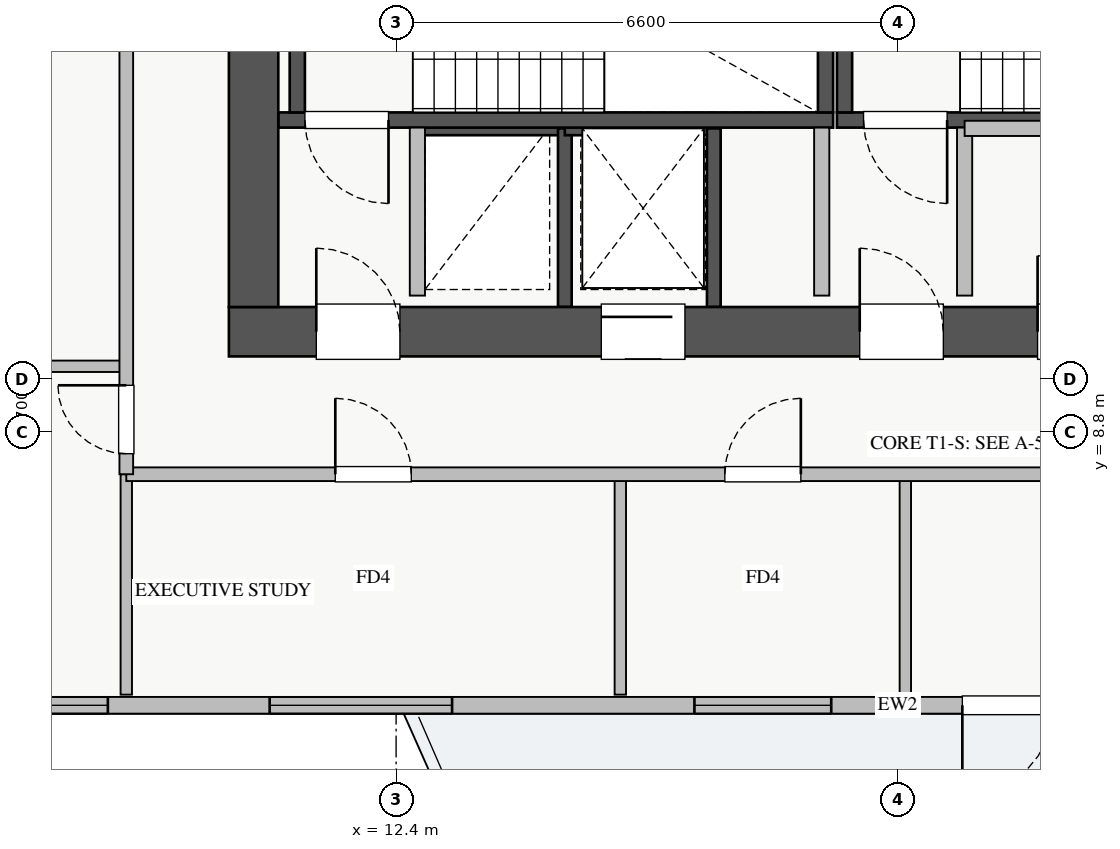
"""IFC4 building model, lengths in metres.
Left out: names, types, materials, properties, quantities, classifications, styles, units other than length and angle.
Written with IfcOpenShell. Run it as: python <this file> out.ifc"""

import sys

from ifc_helpers import new_model, si_unit, direction, frame, frame_2d, origin, place, context, subcontext, project, spatial, rectangle, extrude, source, transform, mapped, element, fill, save


model = new_model("IFC4")
c1 = context("Model", 3, precision=1e-05, world=origin(), true_north=direction((0.0, 1.0)))
c2 = subcontext(c1, "Body", "Model", "MODEL_VIEW")
j1 = project(units=[si_unit("LENGTHUNIT", "METRE"), si_unit("PLANEANGLEUNIT", "RADIAN")], contexts=[c1])
p1 = place(None, origin())
s1 = spatial("IfcSite", under=j1, at=p1, CompositionType="ELEMENT")
p2 = place(p1, origin())
s2 = spatial("IfcBuilding", under=s1, at=p2, CompositionType="ELEMENT")
p3 = place(p2, frame((0.0, 0.0, 119.75)))
s3 = spatial("IfcBuildingStorey", under=s2, at=p3, CompositionType="ELEMENT", Elevation=119.75)
p4 = place(p3, frame((12.68, 12.8, 0.0), z_axis=(0.0, 0.0, 1.0), x_axis=(1.0, 0.0, 0.0)))
e1 = element("IfcWall", 1, at=p4, inside=s3, PredefinedType="SHEAR", context=c2, shape_type="SweptSolid", body=[
    extrude(rectangle(XDim=1.94, YDim=0.18, at=frame_2d((0.97, 0.0))), origin(), (0.0, 0.0, 1.0), 3.07),
])
p5 = place(p3, frame((14.62, 10.45, 0.0), z_axis=(0.0, 0.0, 1.0), x_axis=(0.0, 1.0, 0.0)))
e2 = element("IfcWall", 2, at=p5, inside=s3, PredefinedType="SHEAR", context=c2, shape_type="SweptSolid", body=[
    extrude(rectangle(XDim=2.35, YDim=0.18, at=frame_2d((1.175, 0.0))), origin(), (0.0, 0.0, 1.0), 3.07),
])
p6 = place(p3, frame((14.62, 12.8, 0.0), z_axis=(0.0, 0.0, 1.0), x_axis=(1.0, 0.0, 0.0)))
e3 = element("IfcWall", 3, at=p6, inside=s3, PredefinedType="SHEAR", context=c2, shape_type="SweptSolid", body=[
    extrude(rectangle(XDim=1.96, YDim=0.18, at=frame_2d((0.98, 0.0))), origin(), (0.0, 0.0, 1.0), 3.07),
])
p7 = place(p3, frame((16.58, 10.45, 0.0), z_axis=(0.0, 0.0, 1.0), x_axis=(0.0, 1.0, 0.0)))
e4 = element("IfcWall", 4, at=p7, inside=s3, PredefinedType="SHEAR", context=c2, shape_type="SweptSolid", body=[
    extrude(rectangle(XDim=2.35, YDim=0.18, at=frame_2d((1.175, 0.0))), origin(), (0.0, 0.0, 1.0), 3.07),
])
p8 = place(p3, frame((10.85, 12.91, 0.0), z_axis=(0.0, 0.0, 1.0), x_axis=(1.0, 0.0, 0.0)))
e5 = element("IfcWall", 5, at=p8, inside=s3, PredefinedType="SHEAR", context=c2, shape_type="SweptSolid", body=[
    extrude(rectangle(XDim=7.3, YDim=0.2, at=frame_2d((3.65, 0.0))), origin(), (0.0, 0.0, 1.0), 3.25),
])
p9 = place(p8, frame((0.35, 0.0, 0.0)))
e6 = element("IfcOpeningElement", 6, at=p9, cuts=e5, PredefinedType="OPENING", context=c2, shape_type="SweptSolid", body=[
    extrude(rectangle(XDim=1.1, YDim=2.05, at=frame_2d((0.55, 1.025))), frame((0.0, 0.11, 0.0), z_axis=(0.0, -1.0, 0.0), x_axis=(1.0, 0.0, 0.0)), (0.0, 0.0, 1.0), 0.22),
])
for number, where, z_axis, x_axis in (
    (7, (11.1, 13.01, 0.0), (0.0, 0.0, 1.0), (0.0, 1.0, 0.0)),
    (8, (18.05, 13.01, 0.0), (0.0, 0.0, 1.0), (0.0, 1.0, 0.0)),
):
    element("IfcWall", number, at=place(p3, frame(where, z_axis=z_axis, x_axis=x_axis)), inside=s3, PredefinedType="SHEAR", context=c2, shape_type="SweptSolid", body=[
        extrude(rectangle(XDim=2.94, YDim=0.2, at=frame_2d((1.47, 0.0))), origin(), (0.0, 0.0, 1.0), 3.25),
    ])
p10 = place(p3, frame((18.2, 12.91, 0.0), z_axis=(0.0, 0.0, 1.0), x_axis=(1.0, 0.0, 0.0)))
e9 = element("IfcWall", 9, at=p10, inside=s3, PredefinedType="SHEAR", context=c2, shape_type="SweptSolid", body=[
    extrude(rectangle(XDim=7.15, YDim=0.2, at=frame_2d((3.575, 0.0))), origin(), (0.0, 0.0, 1.0), 3.25),
])
p11 = place(p10, frame((0.35, 0.0, 0.0)))
e10 = element("IfcOpeningElement", 10, at=p11, cuts=e9, PredefinedType="OPENING", context=c2, shape_type="SweptSolid", body=[
    extrude(rectangle(XDim=1.1, YDim=2.05, at=frame_2d((0.55, 1.025))), frame((0.0, 0.11, 0.0), z_axis=(0.0, -1.0, 0.0), x_axis=(1.0, 0.0, 0.0)), (0.0, 0.0, 1.0), 0.22),
])
p12 = place(p3, frame((18.3, 13.01, 0.0), z_axis=(0.0, 0.0, 1.0), x_axis=(0.0, 1.0, 0.0)))
e11 = element("IfcWall", 11, at=p12, inside=s3, PredefinedType="SHEAR", context=c2, shape_type="SweptSolid", body=[
    extrude(rectangle(XDim=2.94, YDim=0.2, at=frame_2d((1.47, 0.0))), origin(), (0.0, 0.0, 1.0), 3.25),
])
p13 = place(p3, frame((10.2, 10.125, 0.0), z_axis=(0.0, 0.0, 1.0), x_axis=(1.0, 0.0, 0.0)))
e12 = element("IfcWall", 12, at=p13, inside=s3, PredefinedType="SHEAR", context=c2, shape_type="SweptSolid", body=[
    extrude(rectangle(XDim=17.6, YDim=0.65, at=frame_2d((8.8, 0.0))), origin(), (0.0, 0.0, 1.0), 3.25),
])
p14 = place(p13, frame((1.15, 0.0, 0.0)))
e13 = element("IfcOpeningElement", 13, at=p14, cuts=e12, PredefinedType="OPENING", context=c2, shape_type="SweptSolid", body=[
    extrude(rectangle(XDim=1.1, YDim=2.05, at=frame_2d((0.55, 1.025))), frame((0.0, 0.335, 0.0), z_axis=(0.0, -1.0, 0.0), x_axis=(1.0, 0.0, 0.0)), (0.0, 0.0, 1.0), 0.67),
])
p15 = place(p13, frame((8.3, 0.0, 0.0)))
e14 = element("IfcOpeningElement", 14, at=p15, cuts=e12, PredefinedType="OPENING", context=c2, shape_type="SweptSolid", body=[
    extrude(rectangle(XDim=1.1, YDim=2.05, at=frame_2d((0.55, 1.025))), frame((0.0, 0.335, 0.0), z_axis=(0.0, -1.0, 0.0), x_axis=(1.0, 0.0, 0.0)), (0.0, 0.0, 1.0), 0.67),
])
p16 = place(p13, frame((4.9, 0.0, 0.0)))
e15 = element("IfcOpeningElement", 15, at=p16, cuts=e12, PredefinedType="OPENING", context=c2, shape_type="SweptSolid", body=[
    extrude(rectangle(XDim=1.1, YDim=2.05, at=frame_2d((0.55, 1.025))), frame((0.0, 0.335, 0.0), z_axis=(0.0, -1.0, 0.0), x_axis=(1.0, 0.0, 0.0)), (0.0, 0.0, 1.0), 0.67),
])
p17 = place(p13, frame((14.74, 0.0, 0.0)))
e16 = element("IfcOpeningElement", 16, at=p17, cuts=e12, PredefinedType="OPENING", context=c2, shape_type="SweptSolid", body=[
    extrude(rectangle(XDim=1.0, YDim=2.05, at=frame_2d((0.5, 1.025))), frame((0.0, 0.335, 0.0), z_axis=(0.0, -1.0, 0.0), x_axis=(1.0, 0.0, 0.0)), (0.0, 0.0, 1.0), 0.67),
])
p18 = place(p13, frame((10.64, 0.0, 0.0)))
e17 = element("IfcOpeningElement", 17, at=p18, cuts=e12, PredefinedType="OPENING", context=c2, shape_type="SweptSolid", body=[
    extrude(rectangle(XDim=1.0, YDim=2.05, at=frame_2d((0.5, 1.025))), frame((0.0, 0.335, 0.0), z_axis=(0.0, -1.0, 0.0), x_axis=(1.0, 0.0, 0.0)), (0.0, 0.0, 1.0), 0.67),
])
p19 = place(p13, frame((13.09, 0.0, 0.0)))
e18 = element("IfcOpeningElement", 18, at=p19, cuts=e12, PredefinedType="OPENING", context=c2, shape_type="SweptSolid", body=[
    extrude(rectangle(XDim=1.0, YDim=2.05, at=frame_2d((0.5, 1.025))), frame((0.0, 0.335, 0.0), z_axis=(0.0, -1.0, 0.0), x_axis=(1.0, 0.0, 0.0)), (0.0, 0.0, 1.0), 0.67),
])
p20 = place(p3, frame((10.525, 10.45, 0.0), z_axis=(0.0, 0.0, 1.0), x_axis=(0.0, 1.0, 0.0)))
e19 = element("IfcWall", 19, at=p20, inside=s3, PredefinedType="SHEAR", context=c2, shape_type="SweptSolid", body=[
    extrude(rectangle(XDim=5.9, YDim=0.65, at=frame_2d((2.95, 0.0))), origin(), (0.0, 0.0, 1.0), 3.25),
])
p21 = place(p3, frame((6.55, 5.21, 0.0), z_axis=(0.0, 0.0, 1.0), x_axis=(1.0, 0.0, 0.0)))
e20 = element("IfcWall", 20, at=p21, inside=s3, PredefinedType="STANDARD", context=c2, shape_type="SweptSolid", body=[
    extrude(rectangle(XDim=24.9, YDim=0.22, at=frame_2d((12.45, 0.0))), origin(), (0.0, 0.0, 1.0), 2.61),
])
p22 = place(p21, frame((13.3, 0.0, 0.0)))
e21 = element("IfcOpeningElement", 21, at=p22, cuts=e20, PredefinedType="OPENING", context=c2, shape_type="SweptSolid", body=[
    extrude(rectangle(XDim=1.2, YDim=2.1, at=frame_2d((0.6, 1.05))), frame((0.0, 0.12, 0.0), z_axis=(0.0, -1.0, 0.0), x_axis=(1.0, 0.0, 0.0)), (0.0, 0.0, 1.0), 0.24),
])
p23 = place(p21, frame((0.258, 0.0, 0.9)))
e22 = element("IfcOpeningElement", 22, at=p23, cuts=e20, PredefinedType="OPENING", context=c2, shape_type="SweptSolid", body=[
    extrude(rectangle(XDim=1.8, YDim=1.5, at=frame_2d((0.9, 0.75))), frame((0.0, 0.12, 0.0), z_axis=(0.0, -1.0, 0.0), x_axis=(1.0, 0.0, 0.0)), (0.0, 0.0, 1.0), 0.24),
])
p24 = place(p21, frame((9.775, 0.0, 0.9)))
e23 = element("IfcOpeningElement", 23, at=p24, cuts=e20, PredefinedType="OPENING", context=c2, shape_type="SweptSolid", body=[
    extrude(rectangle(XDim=1.8, YDim=1.5, at=frame_2d((0.9, 0.75))), frame((0.0, 0.12, 0.0), z_axis=(0.0, -1.0, 0.0), x_axis=(1.0, 0.0, 0.0)), (0.0, 0.0, 1.0), 0.24),
])
p25 = place(p21, frame((14.813, 0.0, 0.9)))
e24 = element("IfcOpeningElement", 24, at=p25, cuts=e20, PredefinedType="OPENING", context=c2, shape_type="SweptSolid", body=[
    extrude(rectangle(XDim=1.5, YDim=1.45, at=frame_2d((0.75, 0.725))), frame((0.0, 0.12, 0.0), z_axis=(0.0, -1.0, 0.0), x_axis=(1.0, 0.0, 0.0)), (0.0, 0.0, 1.0), 0.24),
])
p26 = place(p21, frame((20.738, 0.0, 0.9)))
e25 = element("IfcOpeningElement", 25, at=p26, cuts=e20, PredefinedType="OPENING", context=c2, shape_type="SweptSolid", body=[
    extrude(rectangle(XDim=2.1, YDim=1.48, at=frame_2d((1.05, 0.74))), frame((0.0, 0.12, 0.0), z_axis=(0.0, -1.0, 0.0), x_axis=(1.0, 0.0, 0.0)), (0.0, 0.0, 1.0), 0.24),
])
p27 = place(p21, frame((4.187, 0.0, 0.9)))
e26 = element("IfcOpeningElement", 26, at=p27, cuts=e20, PredefinedType="OPENING", context=c2, shape_type="SweptSolid", body=[
    extrude(rectangle(XDim=2.4, YDim=1.5, at=frame_2d((1.2, 0.75))), frame((0.0, 0.12, 0.0), z_axis=(0.0, -1.0, 0.0), x_axis=(1.0, 0.0, 0.0)), (0.0, 0.0, 1.0), 0.24),
])
for number, where, z_axis, x_axis in (
    (27, (12.68, 10.6, 0.0), (0.0, 0.0, 1.0), (0.0, 1.0, 0.0)),
    (28, (18.0, 10.6, 0.0), (0.0, 0.0, 1.0), (0.0, 1.0, 0.0)),
    (29, (19.88, 10.6, 0.0), (0.0, 0.0, 1.0), (0.0, 1.0, 0.0)),
):
    element("IfcWall", number, at=place(p3, frame(where, z_axis=z_axis, x_axis=x_axis)), inside=s3, PredefinedType="PARTITIONING", context=c2, shape_type="SweptSolid", body=[
        extrude(rectangle(XDim=2.21, YDim=0.2, at=frame_2d((1.105, 0.0))), origin(), (0.0, 0.0, 1.0), 3.07),
    ])
p28 = place(p3, frame((19.88, 12.8, 0.0), z_axis=(0.0, 0.0, 1.0), x_axis=(1.0, 0.0, 0.0)))
e30 = element("IfcWall", 30, at=p28, inside=s3, PredefinedType="PARTITIONING", context=c2, shape_type="SweptSolid", body=[
    extrude(rectangle(XDim=1.87, YDim=0.2, at=frame_2d((0.935, 0.0))), origin(), (0.0, 0.0, 1.0), 3.07),
])
p29 = place(p3, frame((15.35, 5.35, 0.0), z_axis=(0.0, 0.0, 1.0), x_axis=(0.0, 1.0, 0.0)))
e31 = element("IfcWall", 31, at=p29, inside=s3, PredefinedType="PARTITIONING", context=c2, shape_type="SweptSolid", body=[
    extrude(rectangle(XDim=2.9, YDim=0.15, at=frame_2d((1.45, 0.0))), origin(), (0.0, 0.0, 1.0), 3.07),
])
p30 = place(p3, frame((19.1, 5.35, 0.0), z_axis=(0.0, 0.0, 1.0), x_axis=(0.0, 1.0, 0.0)))
e32 = element("IfcWall", 32, at=p30, inside=s3, PredefinedType="PARTITIONING", context=c2, shape_type="SweptSolid", body=[
    extrude(rectangle(XDim=2.9, YDim=0.15, at=frame_2d((1.45, 0.0))), origin(), (0.0, 0.0, 1.0), 2.821),
])
p31 = place(p3, frame((8.85, 5.35, 0.0), z_axis=(0.0, 0.0, 1.0), x_axis=(0.0, 1.0, 0.0)))
e33 = element("IfcWall", 33, at=p31, inside=s3, PredefinedType="PARTITIONING", context=c2, shape_type="SweptSolid", body=[
    extrude(rectangle(XDim=2.9, YDim=0.15, at=frame_2d((1.45, 0.0))), origin(), (0.0, 0.0, 1.0), 3.07),
])
p32 = place(p3, frame((8.85, 8.25, 0.0), z_axis=(0.0, 0.0, 1.0), x_axis=(1.0, 0.0, 0.0)))
e34 = element("IfcWall", 34, at=p32, inside=s3, PredefinedType="PARTITIONING", context=c2, shape_type="SweptSolid", body=[
    extrude(rectangle(XDim=23.57, YDim=0.18, at=frame_2d((11.785, 0.0))), origin(), (0.0, 0.0, 1.0), 3.07),
])
p33 = place(p32, frame((2.75, 0.0, 0.0)))
e35 = element("IfcOpeningElement", 35, at=p33, cuts=e34, PredefinedType="OPENING", context=c2, shape_type="SweptSolid", body=[
    extrude(rectangle(XDim=1.0, YDim=2.05, at=frame_2d((0.5, 1.025))), frame((0.0, 0.1, 0.0), z_axis=(0.0, -1.0, 0.0), x_axis=(1.0, 0.0, 0.0)), (0.0, 0.0, 1.0), 0.2),
])
p34 = place(p32, frame((7.875, 0.0, 0.0)))
e36 = element("IfcOpeningElement", 36, at=p34, cuts=e34, PredefinedType="OPENING", context=c2, shape_type="SweptSolid", body=[
    extrude(rectangle(XDim=1.0, YDim=2.05, at=frame_2d((0.5, 1.025))), frame((0.0, 0.1, 0.0), z_axis=(0.0, -1.0, 0.0), x_axis=(1.0, 0.0, 0.0)), (0.0, 0.0, 1.0), 0.2),
])
p35 = place(p32, frame((13.3, 0.0, 0.0)))
e37 = element("IfcOpeningElement", 37, at=p35, cuts=e34, PredefinedType="OPENING", context=c2, shape_type="SweptSolid", body=[
    extrude(rectangle(XDim=1.0, YDim=2.05, at=frame_2d((0.5, 1.025))), frame((0.0, 0.1, 0.0), z_axis=(0.0, -1.0, 0.0), x_axis=(1.0, 0.0, 0.0)), (0.0, 0.0, 1.0), 0.2),
])
p36 = place(p32, frame((19.74, 0.0, 0.0)))
e38 = element("IfcOpeningElement", 38, at=p36, cuts=e34, PredefinedType="OPENING", context=c2, shape_type="SweptSolid", body=[
    extrude(rectangle(XDim=1.0, YDim=2.05, at=frame_2d((0.5, 1.025))), frame((0.0, 0.1, 0.0), z_axis=(0.0, -1.0, 0.0), x_axis=(1.0, 0.0, 0.0)), (0.0, 0.0, 1.0), 0.2),
])
p37 = place(p3, frame((1.35, 9.67, 0.0), z_axis=(0.0, 0.0, 1.0), x_axis=(1.0, 0.0, 0.0)))
e39 = element("IfcWall", 39, at=p37, inside=s3, PredefinedType="PARTITIONING", context=c2, shape_type="SweptSolid", body=[
    extrude(rectangle(XDim=7.5, YDim=0.15, at=frame_2d((3.75, 0.0))), origin(), (0.0, 0.0, 1.0), 3.07),
])
p38 = place(p3, frame((8.85, 8.25, 0.0), z_axis=(0.0, 0.0, 1.0), x_axis=(0.0, 1.0, 0.0)))
e40 = element("IfcWall", 40, at=p38, inside=s3, PredefinedType="PARTITIONING", context=c2, shape_type="SweptSolid", body=[
    extrude(rectangle(XDim=29.5, YDim=0.18, at=frame_2d((14.75, 0.0))), origin(), (0.0, 0.0, 1.0), 3.07),
])
p39 = place(p38, frame((28.155, 0.0, 0.0)))
e41 = element("IfcOpeningElement", 41, at=p39, cuts=e40, PredefinedType="OPENING", context=c2, shape_type="SweptSolid", body=[
    extrude(rectangle(XDim=0.9, YDim=2.05, at=frame_2d((0.45, 1.025))), frame((0.0, 0.1, 0.0), z_axis=(0.0, -1.0, 0.0), x_axis=(1.0, 0.0, 0.0)), (0.0, 0.0, 1.0), 0.2),
])
p40 = place(p38, frame((0.27, 0.0, 0.0)))
e42 = element("IfcOpeningElement", 42, at=p40, cuts=e40, PredefinedType="OPENING", context=c2, shape_type="SweptSolid", body=[
    extrude(rectangle(XDim=0.9, YDim=2.05, at=frame_2d((0.45, 1.025))), frame((0.0, 0.1, 0.0), z_axis=(0.0, -1.0, 0.0), x_axis=(1.0, 0.0, 0.0)), (0.0, 0.0, 1.0), 0.2),
])
p41 = place(p38, frame((7.255, 0.0, 0.0)))
e43 = element("IfcOpeningElement", 43, at=p41, cuts=e40, PredefinedType="OPENING", context=c2, shape_type="SweptSolid", body=[
    extrude(rectangle(XDim=1.0, YDim=2.05, at=frame_2d((0.5, 1.025))), frame((0.0, 0.1, 0.0), z_axis=(0.0, -1.0, 0.0), x_axis=(1.0, 0.0, 0.0)), (0.0, 0.0, 1.0), 0.2),
])
p42 = place(p38, frame((16.675, 0.0, 0.0)))
e44 = element("IfcOpeningElement", 44, at=p42, cuts=e40, PredefinedType="OPENING", context=c2, shape_type="SweptSolid", body=[
    extrude(rectangle(XDim=1.0, YDim=2.05, at=frame_2d((0.5, 1.025))), frame((0.0, 0.1, 0.0), z_axis=(0.0, -1.0, 0.0), x_axis=(1.0, 0.0, 0.0)), (0.0, 0.0, 1.0), 0.2),
])
m1 = source(origin(), c2, "Body", "SweptSolid", [
    extrude(rectangle(XDim=1.2, YDim=2.1, at=frame_2d((0.6, 1.05))), frame((0.0, 0.025, 0.0), z_axis=(0.0, -1.0, 0.0), x_axis=(1.0, 0.0, 0.0)), (0.0, 0.0, 1.0), 0.05),
])
p43 = place(p22, frame((1.2, 0.0, 0.0), z_axis=(0.0, 0.0, 1.0), x_axis=(-1.0, 0.0, 0.0)))
e45 = element("IfcDoor", 45, at=p43, inside=s3, OperationType="SINGLE_SWING_LEFT", PredefinedType="DOOR", context=c2, shape_type="MappedRepresentation", body=[
    mapped(m1, transform((0.0, 0.0, 0.0), x_axis=(1.0, 0.0, 0.0), y_axis=(0.0, 1.0, 0.0), z_axis=(0.0, 0.0, 1.0), scale=1.0)),
])
fill(e21, e45)
m2 = source(origin(), c2, "Body", "SweptSolid", [
    extrude(rectangle(XDim=1.8, YDim=1.5, at=frame_2d((0.9, 0.75))), frame((0.0, 0.03, 0.0), z_axis=(0.0, -1.0, 0.0), x_axis=(1.0, 0.0, 0.0)), (0.0, 0.0, 1.0), 0.06),
])
p44 = place(p23, origin())
e46 = element("IfcWindow", 46, at=p44, inside=s3, PartitioningType="TRIPLE_PANEL_VERTICAL", PredefinedType="WINDOW", context=c2, shape_type="MappedRepresentation", body=[
    mapped(m2, transform((0.0, 0.0, 0.0), x_axis=(1.0, 0.0, 0.0), y_axis=(0.0, 1.0, 0.0), z_axis=(0.0, 0.0, 1.0), scale=1.0)),
])
fill(e22, e46)
p45 = place(p24, origin())
e47 = element("IfcWindow", 47, at=p45, inside=s3, PartitioningType="DOUBLE_PANEL_VERTICAL", PredefinedType="WINDOW", context=c2, shape_type="MappedRepresentation", body=[
    mapped(m2, transform((0.0, 0.0, 0.0), x_axis=(1.0, 0.0, 0.0), y_axis=(0.0, 1.0, 0.0), z_axis=(0.0, 0.0, 1.0), scale=1.0)),
])
fill(e23, e47)
m3 = source(origin(), c2, "Body", "SweptSolid", [
    extrude(rectangle(XDim=1.1, YDim=2.05, at=frame_2d((0.55, 1.025))), frame((0.0, 0.025, 0.0), z_axis=(0.0, -1.0, 0.0), x_axis=(1.0, 0.0, 0.0)), (0.0, 0.0, 1.0), 0.05),
])
p46 = place(p14, origin())
e48 = element("IfcDoor", 48, at=p46, inside=s3, OperationType="SINGLE_SWING_LEFT", PredefinedType="DOOR", context=c2, shape_type="MappedRepresentation", body=[
    mapped(m3, transform((0.0, 0.0, 0.0), x_axis=(1.0, 0.0, 0.0), y_axis=(0.0, 1.0, 0.0), z_axis=(0.0, 0.0, 1.0), scale=1.0)),
])
fill(e13, e48)
p47 = place(p9, frame((1.1, 0.0, 0.0), z_axis=(0.0, 0.0, 1.0), x_axis=(-1.0, 0.0, 0.0)))
e49 = element("IfcDoor", 49, at=p47, inside=s3, OperationType="SINGLE_SWING_RIGHT", PredefinedType="DOOR", context=c2, shape_type="MappedRepresentation", body=[
    mapped(m3, transform((0.0, 0.0, 0.0), x_axis=(1.0, 0.0, 0.0), y_axis=(0.0, 1.0, 0.0), z_axis=(0.0, 0.0, 1.0), scale=1.0)),
])
fill(e6, e49)
p48 = place(p15, origin())
e50 = element("IfcDoor", 50, at=p48, inside=s3, OperationType="SINGLE_SWING_LEFT", PredefinedType="DOOR", context=c2, shape_type="MappedRepresentation", body=[
    mapped(m3, transform((0.0, 0.0, 0.0), x_axis=(1.0, 0.0, 0.0), y_axis=(0.0, 1.0, 0.0), z_axis=(0.0, 0.0, 1.0), scale=1.0)),
])
fill(e14, e50)
p49 = place(p11, frame((1.1, 0.0, 0.0), z_axis=(0.0, 0.0, 1.0), x_axis=(-1.0, 0.0, 0.0)))
e51 = element("IfcDoor", 51, at=p49, inside=s3, OperationType="SINGLE_SWING_RIGHT", PredefinedType="DOOR", context=c2, shape_type="MappedRepresentation", body=[
    mapped(m3, transform((0.0, 0.0, 0.0), x_axis=(1.0, 0.0, 0.0), y_axis=(0.0, 1.0, 0.0), z_axis=(0.0, 0.0, 1.0), scale=1.0)),
])
fill(e10, e51)
p50 = place(p16, origin())
e52 = element("IfcDoor", 52, at=p50, inside=s3, OperationType="SLIDING_TO_RIGHT", PredefinedType="DOOR", context=c2, shape_type="MappedRepresentation", body=[
    mapped(m3, transform((0.0, 0.0, 0.0), x_axis=(1.0, 0.0, 0.0), y_axis=(0.0, 1.0, 0.0), z_axis=(0.0, 0.0, 1.0), scale=1.0)),
])
fill(e15, e52)
m4 = source(origin(), c2, "Body", "SweptSolid", [
    extrude(rectangle(XDim=1.0, YDim=2.05, at=frame_2d((0.5, 1.025))), frame((0.0, 0.025, 0.0), z_axis=(0.0, -1.0, 0.0), x_axis=(1.0, 0.0, 0.0)), (0.0, 0.0, 1.0), 0.05),
])
p51 = place(p18, origin())
e53 = element("IfcDoor", 53, at=p51, inside=s3, OperationType="SINGLE_SWING_LEFT", PredefinedType="DOOR", context=c2, shape_type="MappedRepresentation", body=[
    mapped(m4, transform((0.0, 0.0, 0.0), x_axis=(1.0, 0.0, 0.0), y_axis=(0.0, 1.0, 0.0), z_axis=(0.0, 0.0, 1.0), scale=1.0)),
])
fill(e17, e53)
p52 = place(p33, origin())
e54 = element("IfcDoor", 54, at=p52, inside=s3, OperationType="SINGLE_SWING_LEFT", PredefinedType="DOOR", context=c2, shape_type="MappedRepresentation", body=[
    mapped(m4, transform((0.0, 0.0, 0.0), x_axis=(1.0, 0.0, 0.0), y_axis=(0.0, 1.0, 0.0), z_axis=(0.0, 0.0, 1.0), scale=1.0)),
])
fill(e35, e54)
p53 = place(p34, origin())
e55 = element("IfcDoor", 55, at=p53, inside=s3, OperationType="SINGLE_SWING_RIGHT", PredefinedType="DOOR", context=c2, shape_type="MappedRepresentation", body=[
    mapped(m4, transform((0.0, 0.0, 0.0), x_axis=(1.0, 0.0, 0.0), y_axis=(0.0, 1.0, 0.0), z_axis=(0.0, 0.0, 1.0), scale=1.0)),
])
fill(e36, e55)
m5 = source(origin(), c2, "Body", "SweptSolid", [
    extrude(rectangle(XDim=0.9, YDim=2.05, at=frame_2d((0.45, 1.025))), frame((0.0, 0.025, 0.0), z_axis=(0.0, -1.0, 0.0), x_axis=(1.0, 0.0, 0.0)), (0.0, 0.0, 1.0), 0.05),
])
p54 = place(p40, origin())
e56 = element("IfcDoor", 56, at=p54, inside=s3, OperationType="SINGLE_SWING_RIGHT", PredefinedType="DOOR", context=c2, shape_type="MappedRepresentation", body=[
    mapped(m5, transform((0.0, 0.0, 0.0), x_axis=(1.0, 0.0, 0.0), y_axis=(0.0, 1.0, 0.0), z_axis=(0.0, 0.0, 1.0), scale=1.0)),
])
fill(e42, e56)
m6 = source(origin(), c2, "Body", "SweptSolid", [
    extrude(rectangle(XDim=2.4, YDim=1.5, at=frame_2d((1.2, 0.75))), frame((0.0, 0.03, 0.0), z_axis=(0.0, -1.0, 0.0), x_axis=(1.0, 0.0, 0.0)), (0.0, 0.0, 1.0), 0.06),
])
p55 = place(p27, origin())
e57 = element("IfcWindow", 57, at=p55, inside=s3, PartitioningType="TRIPLE_PANEL_VERTICAL", PredefinedType="WINDOW", context=c2, shape_type="MappedRepresentation", body=[
    mapped(m6, transform((0.0, 0.0, 0.0), x_axis=(1.0, 0.0, 0.0), y_axis=(0.0, 1.0, 0.0), z_axis=(0.0, 0.0, 1.0), scale=1.0)),
])
fill(e26, e57)
save(model, sys.argv[1])
